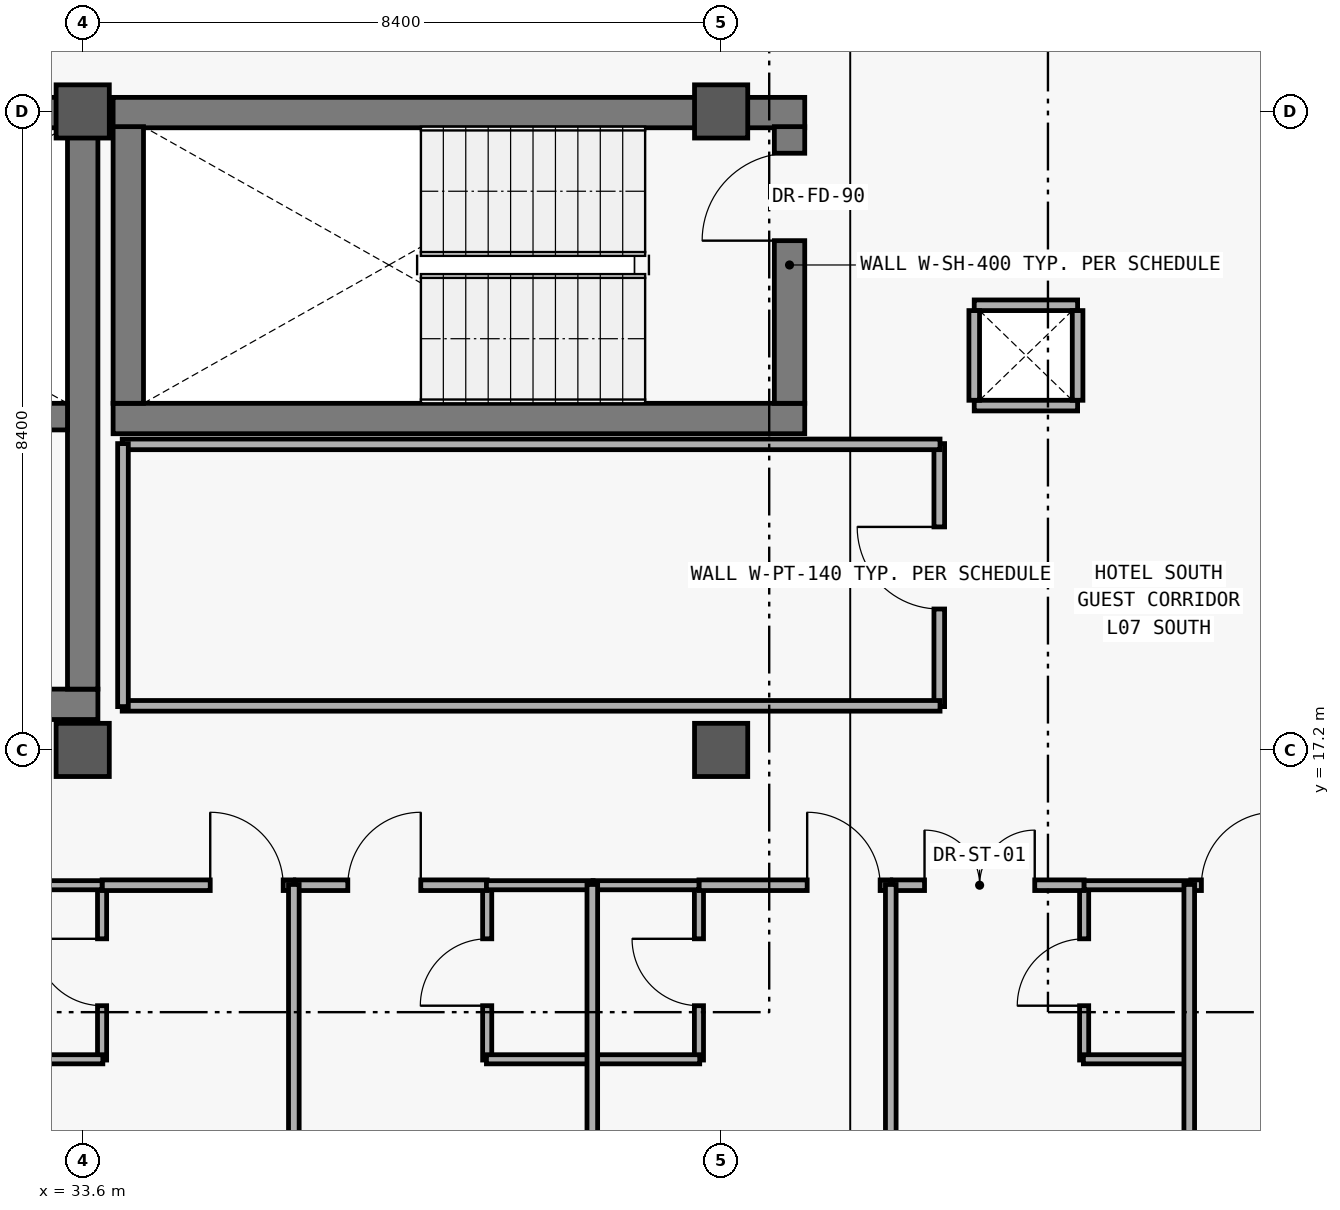
"""IFC4 building model, lengths in metres.
Left out: names, types, materials, properties, quantities, classifications, styles, units other than length and angle.
Written with IfcOpenShell. Run it as: python <this file> out.ifc"""

import sys

from ifc_helpers import new_model, si_unit, direction, frame, frame_2d, origin, origin_2d, place, context, subcontext, project, spatial, rectangle, extrude, element, fill, save


model = new_model("IFC4")
c1 = context("Model", 3, precision=1e-05, world=origin(), true_north=direction((0.0, 1.0)))
c2 = subcontext(c1, "Body", "Model", "MODEL_VIEW")
j1 = project(units=[si_unit("LENGTHUNIT", "METRE"), si_unit("PLANEANGLEUNIT", "RADIAN")], contexts=[c1])
p1 = place(None, origin())
s1 = spatial("IfcSite", under=j1, at=p1, CompositionType="ELEMENT")
p2 = place(p1, origin())
s2 = spatial("IfcBuilding", under=s1, at=p2, CompositionType="ELEMENT")
p3 = place(p2, frame((0.0, 0.0, 30.0)))
s3 = spatial("IfcBuildingStorey", under=s2, at=p3, CompositionType="ELEMENT", Elevation=30.0)
for number, where, z_axis, x_axis in (
    (1, (33.6, 17.2, 0.0), (0.0, 0.0, 1.0), (1.0, 0.0, 0.0)),
    (2, (33.6, 25.6, 0.0), (0.0, 0.0, 1.0), (1.0, 0.0, 0.0)),
    (3, (42.0, 17.2, 0.0), (0.0, 0.0, 1.0), (1.0, 0.0, 0.0)),
    (4, (42.0, 25.6, 0.0), (0.0, 0.0, 1.0), (1.0, 0.0, 0.0)),
):
    element("IfcColumn", number, at=place(p3, frame(where, z_axis=z_axis, x_axis=x_axis)), inside=s3, PredefinedType="COLUMN", context=c2, shape_type="SweptSolid", body=[
        extrude(rectangle(XDim=0.7, YDim=0.7, at=origin_2d()), origin(), (0.0, 0.0, 1.0), 3.6),
    ])
p4 = place(p3, frame((24.6, 17.8, 0.0), z_axis=(0.0, 0.0, 1.0), x_axis=(1.0, 0.0, 0.0)))
e5 = element("IfcWall", 5, at=p4, inside=s3, PredefinedType="SHEAR", context=c2, shape_type="SweptSolid", body=[
    extrude(rectangle(XDim=9.2, YDim=0.4, at=frame_2d((4.6, 0.0))), origin(), (0.0, 0.0, 1.0), 3.32),
])
p5 = place(p4, frame((1.1, 0.0, 0.0)))
e6 = element("IfcOpeningElement", 6, at=p5, cuts=e5, PredefinedType="OPENING", context=c2, shape_type="SweptSolid", body=[
    extrude(rectangle(XDim=1.2, YDim=2.2, at=frame_2d((0.6, 1.1))), frame((0.0, 0.21, 0.0), z_axis=(0.0, -1.0, 0.0), x_axis=(1.0, 0.0, 0.0)), (0.0, 0.0, 1.0), 0.42),
])
p6 = place(p4, frame((3.5, 0.0, 0.0)))
e7 = element("IfcOpeningElement", 7, at=p6, cuts=e5, PredefinedType="OPENING", context=c2, shape_type="SweptSolid", body=[
    extrude(rectangle(XDim=1.1, YDim=2.2, at=frame_2d((0.55, 1.1))), frame((0.0, 0.21, 0.0), z_axis=(0.0, -1.0, 0.0), x_axis=(1.0, 0.0, 0.0)), (0.0, 0.0, 1.0), 0.42),
])
p7 = place(p4, frame((5.9, 0.0, 0.0)))
e8 = element("IfcOpeningElement", 8, at=p7, cuts=e5, PredefinedType="OPENING", context=c2, shape_type="SweptSolid", body=[
    extrude(rectangle(XDim=1.1, YDim=2.2, at=frame_2d((0.55, 1.1))), frame((0.0, 0.21, 0.0), z_axis=(0.0, -1.0, 0.0), x_axis=(1.0, 0.0, 0.0)), (0.0, 0.0, 1.0), 0.42),
])
p8 = place(p3, frame((33.8, 25.585, 0.0), z_axis=(0.0, 0.0, 1.0), x_axis=(-1.0, 0.0, 0.0)))
e9 = element("IfcWall", 9, at=p8, inside=s3, PredefinedType="SHEAR", context=c2, shape_type="SweptSolid", body=[
    extrude(rectangle(XDim=9.2, YDim=0.4, at=frame_2d((4.6, 0.0))), origin(), (0.0, 0.0, 1.0), 3.32),
])
p9 = place(p3, frame((33.6, 18.0, 0.0), z_axis=(0.0, 0.0, 1.0), x_axis=(0.0, 1.0, 0.0)))
e10 = element("IfcWall", 10, at=p9, inside=s3, PredefinedType="SHEAR", context=c2, shape_type="SweptSolid", body=[
    extrude(rectangle(XDim=7.4, YDim=0.4, at=frame_2d((3.7, 0.0))), origin(), (0.0, 0.0, 1.0), 3.32),
])
p10 = place(p3, frame((25.0, 21.585, 0.0), z_axis=(0.0, 0.0, 1.0), x_axis=(1.0, 0.0, 0.0)))
e11 = element("IfcWall", 11, at=p10, inside=s3, PredefinedType="SHEAR", context=c2, shape_type="SweptSolid", body=[
    extrude(rectangle(XDim=8.4, YDim=0.35, at=frame_2d((4.2, 0.0))), origin(), (0.0, 0.0, 1.0), 3.32),
])
for number, where, z_axis, x_axis in (
    (12, (34.0, 21.56, 0.0), (0.0, 0.0, 1.0), (1.0, 0.0, 0.0)),
    (13, (43.1, 25.585, 0.0), (0.0, 0.0, 1.0), (-1.0, 0.0, 0.0)),
):
    element("IfcWall", number, at=place(p3, frame(where, z_axis=z_axis, x_axis=x_axis)), inside=s3, PredefinedType="SHEAR", context=c2, shape_type="SweptSolid", body=[
        extrude(rectangle(XDim=9.1, YDim=0.4, at=frame_2d((4.55, 0.0))), origin(), (0.0, 0.0, 1.0), 3.32),
    ])
p11 = place(p3, frame((34.2, 25.4, 0.0), z_axis=(0.0, 0.0, 1.0), x_axis=(0.0, -1.0, 0.0)))
e14 = element("IfcWall", 14, at=p11, inside=s3, PredefinedType="SHEAR", context=c2, shape_type="SweptSolid", body=[
    extrude(rectangle(XDim=3.64, YDim=0.4, at=frame_2d((1.82, 0.0))), origin(), (0.0, 0.0, 1.0), 3.32),
])
p12 = place(p3, frame((42.9, 21.76, 0.0), z_axis=(0.0, 0.0, 1.0), x_axis=(0.0, 1.0, 0.0)))
e15 = element("IfcWall", 15, at=p12, inside=s3, PredefinedType="SHEAR", context=c2, shape_type="SweptSolid", body=[
    extrude(rectangle(XDim=3.64, YDim=0.4, at=frame_2d((1.82, 0.0))), origin(), (0.0, 0.0, 1.0), 3.32),
])
p13 = place(p12, frame((2.14, 0.0, 0.0)))
e16 = element("IfcOpeningElement", 16, at=p13, cuts=e15, PredefinedType="OPENING", context=c2, shape_type="SweptSolid", body=[
    extrude(rectangle(XDim=1.15, YDim=2.2, at=frame_2d((0.575, 1.1))), frame((0.0, 0.21, 0.0), z_axis=(0.0, -1.0, 0.0), x_axis=(1.0, 0.0, 0.0)), (0.0, 0.0, 1.0), 0.42),
])
p14 = place(p3, frame((33.855, 13.12, 0.0), z_axis=(0.0, 0.0, 1.0), x_axis=(0.0, 1.0, 0.0)))
e17 = element("IfcWall", 17, at=p14, inside=s3, PredefinedType="PARTITIONING", context=c2, shape_type="SweptSolid", body=[
    extrude(rectangle(XDim=2.31, YDim=0.12, at=frame_2d((1.155, 0.0))), origin(), (0.0, 0.0, 1.0), 2.48),
])
p15 = place(p14, frame((0.715, 0.0, 0.0)))
e18 = element("IfcOpeningElement", 18, at=p15, cuts=e17, PredefinedType="OPENING", context=c2, shape_type="SweptSolid", body=[
    extrude(rectangle(XDim=0.88, YDim=2.15, at=frame_2d((0.44, 1.075))), frame((0.0, 0.07, 0.0), z_axis=(0.0, -1.0, 0.0), x_axis=(1.0, 0.0, 0.0)), (0.0, 0.0, 1.0), 0.14),
])
p16 = place(p3, frame((38.922, 13.12, 0.0), z_axis=(0.0, 0.0, 1.0), x_axis=(0.0, 1.0, 0.0)))
e19 = element("IfcWall", 19, at=p16, inside=s3, PredefinedType="PARTITIONING", context=c2, shape_type="SweptSolid", body=[
    extrude(rectangle(XDim=2.31, YDim=0.12, at=frame_2d((1.155, 0.0))), origin(), (0.0, 0.0, 1.0), 2.48),
])
p17 = place(p16, frame((0.715, 0.0, 0.0)))
e20 = element("IfcOpeningElement", 20, at=p17, cuts=e19, PredefinedType="OPENING", context=c2, shape_type="SweptSolid", body=[
    extrude(rectangle(XDim=0.88, YDim=2.15, at=frame_2d((0.44, 1.075))), frame((0.0, 0.07, 0.0), z_axis=(0.0, -1.0, 0.0), x_axis=(1.0, 0.0, 0.0)), (0.0, 0.0, 1.0), 0.14),
])
p18 = place(p3, frame((41.708, 13.12, 0.0), z_axis=(0.0, 0.0, 1.0), x_axis=(0.0, 1.0, 0.0)))
e21 = element("IfcWall", 21, at=p18, inside=s3, PredefinedType="PARTITIONING", context=c2, shape_type="SweptSolid", body=[
    extrude(rectangle(XDim=2.31, YDim=0.12, at=frame_2d((1.155, 0.0))), origin(), (0.0, 0.0, 1.0), 2.48),
])
p19 = place(p18, frame((0.715, 0.0, 0.0)))
e22 = element("IfcOpeningElement", 22, at=p19, cuts=e21, PredefinedType="OPENING", context=c2, shape_type="SweptSolid", body=[
    extrude(rectangle(XDim=0.88, YDim=2.15, at=frame_2d((0.44, 1.075))), frame((0.0, 0.07, 0.0), z_axis=(0.0, -1.0, 0.0), x_axis=(1.0, 0.0, 0.0)), (0.0, 0.0, 1.0), 0.14),
])
p20 = place(p3, frame((46.776, 13.12, 0.0), z_axis=(0.0, 0.0, 1.0), x_axis=(0.0, 1.0, 0.0)))
e23 = element("IfcWall", 23, at=p20, inside=s3, PredefinedType="PARTITIONING", context=c2, shape_type="SweptSolid", body=[
    extrude(rectangle(XDim=2.31, YDim=0.12, at=frame_2d((1.155, 0.0))), origin(), (0.0, 0.0, 1.0), 2.48),
])
p21 = place(p20, frame((0.715, 0.0, 0.0)))
e24 = element("IfcOpeningElement", 24, at=p21, cuts=e23, PredefinedType="OPENING", context=c2, shape_type="SweptSolid", body=[
    extrude(rectangle(XDim=0.88, YDim=2.15, at=frame_2d((0.44, 1.075))), frame((0.0, 0.07, 0.0), z_axis=(0.0, -1.0, 0.0), x_axis=(1.0, 0.0, 0.0)), (0.0, 0.0, 1.0), 0.14),
])
p22 = place(p3, frame((44.87, 17.77, 0.0), z_axis=(0.0, 0.0, 1.0), x_axis=(0.0, 1.0, 0.0)))
e25 = element("IfcWall", 25, at=p22, inside=s3, PredefinedType="PARTITIONING", context=c2, shape_type="SweptSolid", body=[
    extrude(rectangle(XDim=3.46, YDim=0.14, at=frame_2d((1.73, 0.0))), origin(), (0.0, 0.0, 1.0), 2.48),
])
p23 = place(p22, frame((1.284, 0.0, 0.0)))
e26 = element("IfcOpeningElement", 26, at=p23, cuts=e25, PredefinedType="OPENING", context=c2, shape_type="SweptSolid", body=[
    extrude(rectangle(XDim=1.08, YDim=2.25, at=frame_2d((0.54, 1.125))), frame((0.0, 0.08, 0.0), z_axis=(0.0, -1.0, 0.0), x_axis=(1.0, 0.0, 0.0)), (0.0, 0.0, 1.0), 0.16),
])
p24 = place(p3, frame((33.855, 15.42, 0.0), z_axis=(0.0, 0.0, 1.0), x_axis=(1.0, 0.0, 0.0)))
e27 = element("IfcWall", 27, at=p24, inside=s3, PredefinedType="PARTITIONING", context=c2, shape_type="SweptSolid", body=[
    extrude(rectangle(XDim=2.523, YDim=0.14, at=frame_2d((1.261, 0.0))), origin(), (0.0, 0.0, 1.0), 2.48),
])
p25 = place(p24, frame((1.423, 0.0, 0.0)))
e28 = element("IfcOpeningElement", 28, at=p25, cuts=e27, PredefinedType="OPENING", context=c2, shape_type="SweptSolid", body=[
    extrude(rectangle(XDim=0.96, YDim=2.25, at=frame_2d((0.48, 1.125))), frame((0.0, 0.08, 0.0), z_axis=(0.0, -1.0, 0.0), x_axis=(1.0, 0.0, 0.0)), (0.0, 0.0, 1.0), 0.16),
])
p26 = place(p3, frame((36.398, 15.42, 0.0), z_axis=(0.0, 0.0, 1.0), x_axis=(1.0, 0.0, 0.0)))
e29 = element("IfcWall", 29, at=p26, inside=s3, PredefinedType="PARTITIONING", context=c2, shape_type="SweptSolid", body=[
    extrude(rectangle(XDim=2.524, YDim=0.14, at=frame_2d((1.262, 0.0))), origin(), (0.0, 0.0, 1.0), 2.48),
])
p27 = place(p26, frame((0.69, 0.0, 0.0)))
e30 = element("IfcOpeningElement", 30, at=p27, cuts=e29, PredefinedType="OPENING", context=c2, shape_type="SweptSolid", body=[
    extrude(rectangle(XDim=0.96, YDim=2.25, at=frame_2d((0.48, 1.125))), frame((0.0, 0.08, 0.0), z_axis=(0.0, -1.0, 0.0), x_axis=(1.0, 0.0, 0.0)), (0.0, 0.0, 1.0), 0.16),
])
p28 = place(p3, frame((41.708, 15.42, 0.0), z_axis=(0.0, 0.0, 1.0), x_axis=(1.0, 0.0, 0.0)))
e31 = element("IfcWall", 31, at=p28, inside=s3, PredefinedType="PARTITIONING", context=c2, shape_type="SweptSolid", body=[
    extrude(rectangle(XDim=2.524, YDim=0.14, at=frame_2d((1.262, 0.0))), origin(), (0.0, 0.0, 1.0), 2.48),
])
p29 = place(p28, frame((1.424, 0.0, 0.0)))
e32 = element("IfcOpeningElement", 32, at=p29, cuts=e31, PredefinedType="OPENING", context=c2, shape_type="SweptSolid", body=[
    extrude(rectangle(XDim=0.96, YDim=2.25, at=frame_2d((0.48, 1.125))), frame((0.0, 0.08, 0.0), z_axis=(0.0, -1.0, 0.0), x_axis=(1.0, 0.0, 0.0)), (0.0, 0.0, 1.0), 0.16),
])
p30 = place(p3, frame((44.252, 15.42, 0.0), z_axis=(0.0, 0.0, 1.0), x_axis=(1.0, 0.0, 0.0)))
e33 = element("IfcWall", 33, at=p30, inside=s3, PredefinedType="PARTITIONING", context=c2, shape_type="SweptSolid", body=[
    extrude(rectangle(XDim=2.524, YDim=0.14, at=frame_2d((1.262, 0.0))), origin(), (0.0, 0.0, 1.0), 2.48),
])
p31 = place(p30, frame((0.424, 0.0, 0.0)))
e34 = element("IfcOpeningElement", 34, at=p31, cuts=e33, PredefinedType="OPENING", context=c2, shape_type="SweptSolid", body=[
    extrude(rectangle(XDim=1.45, YDim=2.3, at=frame_2d((0.725, 1.15))), frame((0.0, 0.08, 0.0), z_axis=(0.0, -1.0, 0.0), x_axis=(1.0, 0.0, 0.0)), (0.0, 0.0, 1.0), 0.16),
])
p32 = place(p3, frame((48.179, 15.42, 0.0), z_axis=(0.0, 0.0, 1.0), x_axis=(1.0, 0.0, 0.0)))
e35 = element("IfcWall", 35, at=p32, inside=s3, PredefinedType="PARTITIONING", context=c2, shape_type="SweptSolid", body=[
    extrude(rectangle(XDim=2.524, YDim=0.14, at=frame_2d((1.262, 0.0))), origin(), (0.0, 0.0, 1.0), 2.48),
])
p33 = place(p32, frame((0.14, 0.0, 0.0)))
e36 = element("IfcOpeningElement", 36, at=p33, cuts=e35, PredefinedType="OPENING", context=c2, shape_type="SweptSolid", body=[
    extrude(rectangle(XDim=0.96, YDim=2.25, at=frame_2d((0.48, 1.125))), frame((0.0, 0.08, 0.0), z_axis=(0.0, -1.0, 0.0), x_axis=(1.0, 0.0, 0.0)), (0.0, 0.0, 1.0), 0.16),
])
p34 = place(p3, frame((32.462, 13.13, 0.0), z_axis=(0.0, 0.0, 1.0), x_axis=(1.0, 0.0, 0.0)))
e37 = element("IfcWall", 37, at=p34, inside=s3, PredefinedType="PARTITIONING", context=c2, shape_type="SweptSolid", body=[
    extrude(rectangle(XDim=1.403, YDim=0.12, at=frame_2d((0.702, 0.0))), origin(), (0.0, 0.0, 1.0), 2.48),
])
p35 = place(p3, frame((32.462, 15.42, 0.0), z_axis=(0.0, 0.0, 1.0), x_axis=(1.0, 0.0, 0.0)))
e38 = element("IfcWall", 38, at=p35, inside=s3, PredefinedType="PARTITIONING", context=c2, shape_type="SweptSolid", body=[
    extrude(rectangle(XDim=1.393, YDim=0.12, at=frame_2d((0.697, 0.0))), origin(), (0.0, 0.0, 1.0), 2.48),
])
for number, where, z_axis, x_axis in (
    (39, (38.912, 13.13, 0.0), (0.0, 0.0, 1.0), (1.0, 0.0, 0.0)),
    (40, (38.912, 15.42, 0.0), (0.0, 0.0, 1.0), (1.0, 0.0, 0.0)),
):
    element("IfcWall", number, at=place(p3, frame(where, z_axis=z_axis, x_axis=x_axis)), inside=s3, PredefinedType="PARTITIONING", context=c2, shape_type="SweptSolid", body=[
        extrude(rectangle(XDim=1.403, YDim=0.12, at=frame_2d((0.701, 0.0))), origin(), (0.0, 0.0, 1.0), 2.48),
    ])
p36 = place(p3, frame((40.315, 13.13, 0.0), z_axis=(0.0, 0.0, 1.0), x_axis=(1.0, 0.0, 0.0)))
e41 = element("IfcWall", 41, at=p36, inside=s3, PredefinedType="PARTITIONING", context=c2, shape_type="SweptSolid", body=[
    extrude(rectangle(XDim=1.403, YDim=0.12, at=frame_2d((0.702, 0.0))), origin(), (0.0, 0.0, 1.0), 2.48),
])
p37 = place(p3, frame((40.315, 15.42, 0.0), z_axis=(0.0, 0.0, 1.0), x_axis=(1.0, 0.0, 0.0)))
e42 = element("IfcWall", 42, at=p37, inside=s3, PredefinedType="PARTITIONING", context=c2, shape_type="SweptSolid", body=[
    extrude(rectangle(XDim=1.393, YDim=0.12, at=frame_2d((0.697, 0.0))), origin(), (0.0, 0.0, 1.0), 2.48),
])
p38 = place(p3, frame((46.766, 13.13, 0.0), z_axis=(0.0, 0.0, 1.0), x_axis=(1.0, 0.0, 0.0)))
e43 = element("IfcWall", 43, at=p38, inside=s3, PredefinedType="PARTITIONING", context=c2, shape_type="SweptSolid", body=[
    extrude(rectangle(XDim=1.403, YDim=0.12, at=frame_2d((0.701, 0.0))), origin(), (0.0, 0.0, 1.0), 2.48),
])
p39 = place(p3, frame((46.776, 15.42, 0.0), z_axis=(0.0, 0.0, 1.0), x_axis=(1.0, 0.0, 0.0)))
e44 = element("IfcWall", 44, at=p39, inside=s3, PredefinedType="PARTITIONING", context=c2, shape_type="SweptSolid", body=[
    extrude(rectangle(XDim=1.393, YDim=0.12, at=frame_2d((0.697, 0.0))), origin(), (0.0, 0.0, 1.0), 2.48),
])
for number, where, z_axis, x_axis in (
    (45, (34.12, 17.78, 0.0), (0.0, 0.0, 1.0), (1.0, 0.0, 0.0)),
    (46, (34.12, 21.22, 0.0), (0.0, 0.0, 1.0), (1.0, 0.0, 0.0)),
):
    element("IfcWall", number, at=place(p3, frame(where, z_axis=z_axis, x_axis=x_axis)), inside=s3, PredefinedType="PARTITIONING", context=c2, shape_type="SweptSolid", body=[
        extrude(rectangle(XDim=10.76, YDim=0.14, at=frame_2d((5.38, 0.0))), origin(), (0.0, 0.0, 1.0), 2.48),
    ])
p40 = place(p3, frame((34.13, 17.77, 0.0), z_axis=(0.0, 0.0, 1.0), x_axis=(0.0, 1.0, 0.0)))
e47 = element("IfcWall", 47, at=p40, inside=s3, PredefinedType="PARTITIONING", context=c2, shape_type="SweptSolid", body=[
    extrude(rectangle(XDim=3.46, YDim=0.14, at=frame_2d((1.73, 0.0))), origin(), (0.0, 0.0, 1.0), 2.48),
])
for number, where, z_axis, x_axis in (
    (48, (36.378, 9.08, 0.0), (0.0, 0.0, 1.0), (0.0, 1.0, 0.0)),
    (49, (40.305, 9.08, 0.0), (0.0, 0.0, 1.0), (0.0, 1.0, 0.0)),
    (50, (44.232, 9.08, 0.0), (0.0, 0.0, 1.0), (0.0, 1.0, 0.0)),
    (51, (48.159, 9.08, 0.0), (0.0, 0.0, 1.0), (0.0, 1.0, 0.0)),
):
    element("IfcWall", number, at=place(p3, frame(where, z_axis=z_axis, x_axis=x_axis)), inside=s3, PredefinedType="PARTITIONING", context=c2, shape_type="SweptSolid", body=[
        extrude(rectangle(XDim=6.35, YDim=0.14, at=frame_2d((3.175, 0.0))), origin(), (0.0, 0.0, 1.0), 2.48),
    ])
for number, where, z_axis, x_axis in (
    (52, (45.33, 21.73, 0.0), (0.0, 0.0, 1.0), (1.0, 0.0, 0.0)),
    (53, (46.69, 23.05, 0.0), (0.0, 0.0, 1.0), (-1.0, 0.0, 0.0)),
):
    element("IfcWall", number, at=place(p3, frame(where, z_axis=z_axis, x_axis=x_axis)), inside=s3, PredefinedType="PARTITIONING", context=c2, shape_type="SweptSolid", body=[
        extrude(rectangle(XDim=1.36, YDim=0.14, at=frame_2d((0.68, 0.0))), origin(), (0.0, 0.0, 1.0), 2.44),
    ])
for number, where, z_axis, x_axis in (
    (54, (45.33, 22.98, 0.0), (0.0, 0.0, 1.0), (0.0, -1.0, 0.0)),
    (55, (46.69, 21.8, 0.0), (0.0, 0.0, 1.0), (0.0, 1.0, 0.0)),
):
    element("IfcWall", number, at=place(p3, frame(where, z_axis=z_axis, x_axis=x_axis)), inside=s3, PredefinedType="PARTITIONING", context=c2, shape_type="SweptSolid", body=[
        extrude(rectangle(XDim=1.18, YDim=0.14, at=frame_2d((0.59, 0.0))), origin(), (0.0, 0.0, 1.0), 2.44),
    ])
p41 = place(p13, origin())
e56 = element("IfcDoor", 56, at=p41, inside=s3, OperationType="SINGLE_SWING_LEFT", PredefinedType="DOOR", context=c2, shape_type="SweptSolid", body=[
    extrude(rectangle(XDim=1.15, YDim=2.2, at=frame_2d((0.575, 1.1))), frame((0.0, 0.025, 0.0), z_axis=(0.0, -1.0, 0.0), x_axis=(1.0, 0.0, 0.0)), (0.0, 0.0, 1.0), 0.05),
])
fill(e16, e56)
p42 = place(p15, origin())
e57 = element("IfcDoor", 57, at=p42, inside=s3, OperationType="SINGLE_SWING_RIGHT", PredefinedType="DOOR", context=c2, shape_type="SweptSolid", body=[
    extrude(rectangle(XDim=0.88, YDim=2.15, at=frame_2d((0.44, 1.075))), frame((0.0, 0.025, 0.0), z_axis=(0.0, -1.0, 0.0), x_axis=(1.0, 0.0, 0.0)), (0.0, 0.0, 1.0), 0.05),
])
fill(e18, e57)
p43 = place(p17, origin())
e58 = element("IfcDoor", 58, at=p43, inside=s3, OperationType="SINGLE_SWING_LEFT", PredefinedType="DOOR", context=c2, shape_type="SweptSolid", body=[
    extrude(rectangle(XDim=0.88, YDim=2.15, at=frame_2d((0.44, 1.075))), frame((0.0, 0.025, 0.0), z_axis=(0.0, -1.0, 0.0), x_axis=(1.0, 0.0, 0.0)), (0.0, 0.0, 1.0), 0.05),
])
fill(e20, e58)
p44 = place(p19, origin())
e59 = element("IfcDoor", 59, at=p44, inside=s3, OperationType="SINGLE_SWING_RIGHT", PredefinedType="DOOR", context=c2, shape_type="SweptSolid", body=[
    extrude(rectangle(XDim=0.88, YDim=2.15, at=frame_2d((0.44, 1.075))), frame((0.0, 0.025, 0.0), z_axis=(0.0, -1.0, 0.0), x_axis=(1.0, 0.0, 0.0)), (0.0, 0.0, 1.0), 0.05),
])
fill(e22, e59)
p45 = place(p21, origin())
e60 = element("IfcDoor", 60, at=p45, inside=s3, OperationType="SINGLE_SWING_LEFT", PredefinedType="DOOR", context=c2, shape_type="SweptSolid", body=[
    extrude(rectangle(XDim=0.88, YDim=2.15, at=frame_2d((0.44, 1.075))), frame((0.0, 0.025, 0.0), z_axis=(0.0, -1.0, 0.0), x_axis=(1.0, 0.0, 0.0)), (0.0, 0.0, 1.0), 0.05),
])
fill(e24, e60)
p46 = place(p23, origin())
e61 = element("IfcDoor", 61, at=p46, inside=s3, OperationType="SINGLE_SWING_RIGHT", PredefinedType="DOOR", context=c2, shape_type="SweptSolid", body=[
    extrude(rectangle(XDim=1.08, YDim=2.25, at=frame_2d((0.54, 1.125))), frame((0.0, 0.025, 0.0), z_axis=(0.0, -1.0, 0.0), x_axis=(1.0, 0.0, 0.0)), (0.0, 0.0, 1.0), 0.05),
])
fill(e26, e61)
p47 = place(p25, origin())
e62 = element("IfcDoor", 62, at=p47, inside=s3, OperationType="SINGLE_SWING_LEFT", PredefinedType="DOOR", context=c2, shape_type="SweptSolid", body=[
    extrude(rectangle(XDim=0.96, YDim=2.25, at=frame_2d((0.48, 1.125))), frame((0.0, 0.025, 0.0), z_axis=(0.0, -1.0, 0.0), x_axis=(1.0, 0.0, 0.0)), (0.0, 0.0, 1.0), 0.05),
])
fill(e28, e62)
p48 = place(p27, origin())
e63 = element("IfcDoor", 63, at=p48, inside=s3, OperationType="SINGLE_SWING_RIGHT", PredefinedType="DOOR", context=c2, shape_type="SweptSolid", body=[
    extrude(rectangle(XDim=0.96, YDim=2.25, at=frame_2d((0.48, 1.125))), frame((0.0, 0.025, 0.0), z_axis=(0.0, -1.0, 0.0), x_axis=(1.0, 0.0, 0.0)), (0.0, 0.0, 1.0), 0.05),
])
fill(e30, e63)
p49 = place(p29, origin())
e64 = element("IfcDoor", 64, at=p49, inside=s3, OperationType="SINGLE_SWING_LEFT", PredefinedType="DOOR", context=c2, shape_type="SweptSolid", body=[
    extrude(rectangle(XDim=0.96, YDim=2.25, at=frame_2d((0.48, 1.125))), frame((0.0, 0.025, 0.0), z_axis=(0.0, -1.0, 0.0), x_axis=(1.0, 0.0, 0.0)), (0.0, 0.0, 1.0), 0.05),
])
fill(e32, e64)
p50 = place(p31, origin())
e65 = element("IfcDoor", 65, at=p50, inside=s3, OperationType="DOUBLE_DOOR_SINGLE_SWING", PredefinedType="DOOR", context=c2, shape_type="SweptSolid", body=[
    extrude(rectangle(XDim=1.45, YDim=2.3, at=frame_2d((0.725, 1.15))), frame((0.0, 0.025, 0.0), z_axis=(0.0, -1.0, 0.0), x_axis=(1.0, 0.0, 0.0)), (0.0, 0.0, 1.0), 0.05),
])
fill(e34, e65)
p51 = place(p33, origin())
e66 = element("IfcDoor", 66, at=p51, inside=s3, OperationType="SINGLE_SWING_RIGHT", PredefinedType="DOOR", context=c2, shape_type="SweptSolid", body=[
    extrude(rectangle(XDim=0.96, YDim=2.25, at=frame_2d((0.48, 1.125))), frame((0.0, 0.025, 0.0), z_axis=(0.0, -1.0, 0.0), x_axis=(1.0, 0.0, 0.0)), (0.0, 0.0, 1.0), 0.05),
])
fill(e36, e66)
save(model, sys.argv[1])
